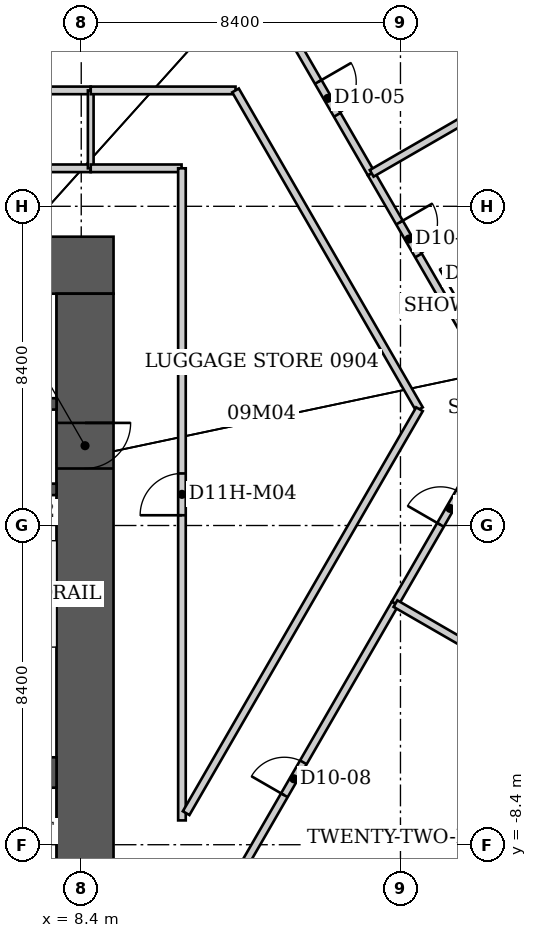
"""IFC4 building model, lengths in metres.
Left out: names, types, materials, properties, quantities, classifications, styles, units other than length and angle.
Written with IfcOpenShell. Run it as: python <this file> out.ifc"""

import sys

from ifc_helpers import new_model, si_unit, direction, frame, frame_2d, origin, place, context, subcontext, project, spatial, rectangle, extrude, element, fill, save


model = new_model("IFC4")
c1 = context("Model", 3, precision=1e-05, world=origin(), true_north=direction((0.0, 1.0)))
c2 = subcontext(c1, "Body", "Model", "MODEL_VIEW")
j1 = project(units=[si_unit("LENGTHUNIT", "METRE"), si_unit("PLANEANGLEUNIT", "RADIAN")], contexts=[c1])
p1 = place(None, origin())
s1 = spatial("IfcSite", under=j1, at=p1, CompositionType="ELEMENT")
p2 = place(p1, origin())
s2 = spatial("IfcBuilding", under=s1, at=p2, CompositionType="ELEMENT")
p3 = place(p2, frame((0.0, 0.0, 42.0)))
s3 = spatial("IfcBuildingStorey", under=s2, at=p3, CompositionType="ELEMENT", Elevation=42.0)
p4 = place(p3, frame((-9.25, 6.85, 0.0), z_axis=(0.0, 0.0, 1.0), x_axis=(1.0, 0.0, 0.0)))
e1 = element("IfcWall", 1, at=p4, inside=s3, PredefinedType="SHEAR", context=c2, shape_type="SweptSolid", body=[
    extrude(rectangle(XDim=18.5, YDim=1.5, at=frame_2d((9.25, 0.0))), origin(), (0.0, 0.0, 1.0), 3.8),
])
p5 = place(p3, frame((8.5, -9.2, 0.0), z_axis=(0.0, 0.0, 1.0), x_axis=(0.0, 1.0, 0.0)))
e2 = element("IfcWall", 2, at=p5, inside=s3, PredefinedType="SHEAR", context=c2, shape_type="SweptSolid", body=[
    extrude(rectangle(XDim=15.3, YDim=1.5, at=frame_2d((7.65, 0.0))), origin(), (0.0, 0.0, 1.0), 3.8),
])
p6 = place(p5, frame((10.7, 0.0, 0.0)))
e3 = element("IfcOpeningElement", 3, at=p6, cuts=e2, PredefinedType="OPENING", context=c2, shape_type="SweptSolid", body=[
    extrude(rectangle(XDim=1.2, YDim=2.2, at=frame_2d((0.6, 1.1))), frame((0.0, 0.75, 0.0), z_axis=(0.0, -1.0, 0.0), x_axis=(1.0, 0.0, 0.0)), (0.0, 0.0, 1.0), 1.5),
])
p7 = place(p3, frame((-7.75, -6.5, 0.0), z_axis=(0.0, 0.0, 1.0), x_axis=(1.0, 0.0, 0.0)))
e4 = element("IfcWall", 4, at=p7, inside=s3, PredefinedType="SHEAR", context=c2, shape_type="SweptSolid", body=[
    extrude(rectangle(XDim=15.5, YDim=0.8, at=frame_2d((7.75, 0.0))), origin(), (0.0, 0.0, 1.0), 3.8),
])
p8 = place(p3, frame((4.75, 0.95, 0.0), z_axis=(0.0, 0.0, 1.0), x_axis=(1.0, 0.0, 0.0)))
e5 = element("IfcWall", 5, at=p8, inside=s3, PredefinedType="SHEAR", context=c2, shape_type="SweptSolid", body=[
    extrude(rectangle(XDim=3.0, YDim=0.3, at=frame_2d((1.5, 0.0))), origin(), (0.0, 0.0, 1.0), 3.8),
])
p9 = place(p8, frame((1.15, 0.0, 0.0)))
e6 = element("IfcOpeningElement", 6, at=p9, cuts=e5, PredefinedType="OPENING", context=c2, shape_type="SweptSolid", body=[
    extrude(rectangle(XDim=1.0, YDim=2.2, at=frame_2d((0.5, 1.1))), frame((0.0, 0.15, 0.0), z_axis=(0.0, -1.0, 0.0), x_axis=(1.0, 0.0, 0.0)), (0.0, 0.0, 1.0), 0.3),
])
p10 = place(p3, frame((-7.75, 3.2, 0.0), z_axis=(0.0, 0.0, 1.0), x_axis=(1.0, 0.0, 0.0)))
e7 = element("IfcWall", 7, at=p10, inside=s3, PredefinedType="SHEAR", context=c2, shape_type="SweptSolid", body=[
    extrude(rectangle(XDim=15.5, YDim=0.3, at=frame_2d((7.75, 0.0))), origin(), (0.0, 0.0, 1.0), 3.8),
])
p11 = place(p10, frame((5.944, 0.0, 0.0)))
e8 = element("IfcOpeningElement", 8, at=p11, cuts=e7, PredefinedType="OPENING", context=c2, shape_type="SweptSolid", body=[
    extrude(rectangle(XDim=1.1, YDim=2.2, at=frame_2d((0.55, 1.1))), frame((0.0, 0.15, 0.0), z_axis=(0.0, -1.0, 0.0), x_axis=(1.0, 0.0, 0.0)), (0.0, 0.0, 1.0), 0.3),
])
p12 = place(p10, frame((11.144, 0.0, 0.0)))
e9 = element("IfcOpeningElement", 9, at=p12, cuts=e7, PredefinedType="OPENING", context=c2, shape_type="SweptSolid", body=[
    extrude(rectangle(XDim=1.1, YDim=2.2, at=frame_2d((0.55, 1.1))), frame((0.0, 0.15, 0.0), z_axis=(0.0, -1.0, 0.0), x_axis=(1.0, 0.0, 0.0)), (0.0, 0.0, 1.0), 0.3),
])
p13 = place(p3, frame((0.0, 11.45, 0.0), z_axis=(0.0, 0.0, 1.0), x_axis=(1.0, 0.0, 0.0)))
e10 = element("IfcWall", 10, at=p13, inside=s3, PredefinedType="PARTITIONING", context=c2, shape_type="SweptSolid", body=[
    extrude(rectangle(XDim=8.65, YDim=0.2, at=frame_2d((4.325, 0.0))), origin(), (0.0, 0.0, 1.0), 3.64),
])
p14 = place(p13, frame((3.775, 0.0, 0.0)))
e11 = element("IfcOpeningElement", 11, at=p14, cuts=e10, PredefinedType="OPENING", context=c2, shape_type="SweptSolid", body=[
    extrude(rectangle(XDim=1.1, YDim=2.2, at=frame_2d((0.55, 1.1))), frame((0.0, 0.1, 0.0), z_axis=(0.0, -1.0, 0.0), x_axis=(1.0, 0.0, 0.0)), (0.0, 0.0, 1.0), 0.2),
])
p15 = place(p3, frame((8.65, 9.4, 0.0), z_axis=(0.0, 0.0, 1.0), x_axis=(-1.0, 0.0, 0.0)))
e12 = element("IfcWall", 12, at=p15, inside=s3, PredefinedType="PARTITIONING", context=c2, shape_type="SweptSolid", body=[
    extrude(rectangle(XDim=8.65, YDim=0.2, at=frame_2d((4.325, 0.0))), origin(), (0.0, 0.0, 1.0), 3.64),
])
p16 = place(p3, frame((8.65, 11.45, 0.0), z_axis=(0.0, 0.0, 1.0), x_axis=(0.0, -1.0, 0.0)))
e13 = element("IfcWall", 13, at=p16, inside=s3, PredefinedType="PARTITIONING", context=c2, shape_type="SweptSolid", body=[
    extrude(rectangle(XDim=2.05, YDim=0.15, at=frame_2d((1.025, 0.0))), origin(), (0.0, 0.0, 1.0), 3.64),
])
p17 = place(p3, frame((8.65, 11.45, 0.0), z_axis=(0.0, 0.0, 1.0), x_axis=(1.0, 0.0, 0.0)))
e14 = element("IfcWall", 14, at=p17, inside=s3, PredefinedType="PARTITIONING", context=c2, shape_type="SweptSolid", body=[
    extrude(rectangle(XDim=3.81, YDim=0.2, at=frame_2d((1.905, 0.0))), origin(), (0.0, 0.0, 1.0), 3.64),
])
p18 = place(p3, frame((11.04, 9.4, 0.0), z_axis=(0.0, 0.0, 1.0), x_axis=(-1.0, 0.0, 0.0)))
e15 = element("IfcWall", 15, at=p18, inside=s3, PredefinedType="PARTITIONING", context=c2, shape_type="SweptSolid", body=[
    extrude(rectangle(XDim=2.39, YDim=0.2, at=frame_2d((1.195, 0.0))), origin(), (0.0, 0.0, 1.0), 3.64),
])
p19 = place(p3, frame((11.05, -7.76, 0.0), z_axis=(0.0, 0.0, 1.0), x_axis=(0.0, 1.0, 0.0)))
e16 = element("IfcWall", 16, at=p19, inside=s3, PredefinedType="PARTITIONING", context=c2, shape_type="SweptSolid", body=[
    extrude(rectangle(XDim=17.16, YDim=0.2, at=frame_2d((8.58, 0.0))), origin(), (0.0, 0.0, 1.0), 3.64),
])
p20 = place(p19, frame((8.03, 0.0, 0.0)))
e17 = element("IfcOpeningElement", 17, at=p20, cuts=e16, PredefinedType="OPENING", context=c2, shape_type="SweptSolid", body=[
    extrude(rectangle(XDim=1.1, YDim=2.2, at=frame_2d((0.55, 1.1))), frame((0.0, 0.1, 0.0), z_axis=(0.0, -1.0, 0.0), x_axis=(1.0, 0.0, 0.0)), (0.0, 0.0, 1.0), 0.2),
])
p21 = place(p3, frame((11.33, -11.28, 0.0), z_axis=(0.0, 0.0, 1.0), x_axis=(0.50006348966, 0.865988744909, 0.0)))
e18 = element("IfcWall", 18, at=p21, inside=s3, PredefinedType="PARTITIONING", context=c2, shape_type="SweptSolid", body=[
    extrude(rectangle(XDim=10.658, YDim=0.2, at=frame_2d((5.329, 0.0))), origin(), (0.0, 0.0, 1.0), 3.64),
])
p22 = place(p21, frame((4.829, 0.0, 0.0)))
e19 = element("IfcOpeningElement", 19, at=p22, cuts=e18, PredefinedType="OPENING", context=c2, shape_type="SweptSolid", body=[
    extrude(rectangle(XDim=1.0, YDim=2.13, at=frame_2d((0.5, 1.065))), frame((0.0, 0.1, 0.0), z_axis=(0.0, -1.0, 0.0), x_axis=(1.0, 0.0, 0.0)), (0.0, 0.0, 1.0), 0.2),
])
p23 = place(p3, frame((12.46, 11.45, 0.0), z_axis=(0.0, 0.0, 1.0), x_axis=(0.499704269421, -0.866196076603, 0.0)))
e20 = element("IfcWall", 20, at=p23, inside=s3, PredefinedType="PARTITIONING", context=c2, shape_type="SweptSolid", body=[
    extrude(rectangle(XDim=9.686, YDim=0.2, at=frame_2d((4.843, 0.0))), origin(), (0.0, 0.0, 1.0), 3.64),
])
p24 = place(p3, frame((13.742, 13.22, 0.0), z_axis=(0.0, 0.0, 1.0), x_axis=(0.500169095125, -0.865927754655, 0.0)))
e21 = element("IfcWall", 21, at=p24, inside=s3, PredefinedType="PARTITIONING", context=c2, shape_type="SweptSolid", body=[
    extrude(rectangle(XDim=4.574, YDim=0.2, at=frame_2d((2.287, 0.0))), origin(), (0.0, 0.0, 1.0), 3.64),
])
p25 = place(p24, frame((1.787, 0.0, 0.0)))
e22 = element("IfcOpeningElement", 22, at=p25, cuts=e21, PredefinedType="OPENING", context=c2, shape_type="SweptSolid", body=[
    extrude(rectangle(XDim=1.0, YDim=2.13, at=frame_2d((0.5, 1.065))), frame((0.0, 0.1, 0.0), z_axis=(0.0, -1.0, 0.0), x_axis=(1.0, 0.0, 0.0)), (0.0, 0.0, 1.0), 0.2),
])
p26 = place(p3, frame((16.03, 9.26, 0.0), z_axis=(0.0, 0.0, 1.0), x_axis=(0.500123041693, -0.865954353975, 0.0)))
e23 = element("IfcWall", 23, at=p26, inside=s3, PredefinedType="PARTITIONING", context=c2, shape_type="SweptSolid", body=[
    extrude(rectangle(XDim=3.974, YDim=0.2, at=frame_2d((1.987, 0.0))), origin(), (0.0, 0.0, 1.0), 3.64),
])
p27 = place(p26, frame((1.487, 0.0, 0.0)))
e24 = element("IfcOpeningElement", 24, at=p27, cuts=e23, PredefinedType="OPENING", context=c2, shape_type="SweptSolid", body=[
    extrude(rectangle(XDim=1.0, YDim=2.13, at=frame_2d((0.5, 1.065))), frame((0.0, 0.1, 0.0), z_axis=(0.0, -1.0, 0.0), x_axis=(1.0, 0.0, 0.0)), (0.0, 0.0, 1.0), 0.2),
])
p28 = place(p3, frame((16.66, -2.05, 0.0), z_axis=(0.0, 0.0, 1.0), x_axis=(0.499994452889, 0.866028606387, 0.0)))
e25 = element("IfcWall", 25, at=p28, inside=s3, PredefinedType="PARTITIONING", context=c2, shape_type="SweptSolid", body=[
    extrude(rectangle(XDim=5.775, YDim=0.2, at=frame_2d((2.888, 0.0))), origin(), (0.0, 0.0, 1.0), 3.64),
])
p29 = place(p28, frame((2.388, 0.0, 0.0)))
e26 = element("IfcOpeningElement", 26, at=p29, cuts=e25, PredefinedType="OPENING", context=c2, shape_type="SweptSolid", body=[
    extrude(rectangle(XDim=1.0, YDim=2.13, at=frame_2d((0.5, 1.065))), frame((0.0, 0.1, 0.0), z_axis=(0.0, -1.0, 0.0), x_axis=(1.0, 0.0, 0.0)), (0.0, 0.0, 1.0), 0.2),
])
p30 = place(p3, frame((17.3, 3.06, 0.0), z_axis=(0.0, 0.0, 1.0), x_axis=(-0.500175206663, -0.865924224537, 0.0)))
e27 = element("IfcWall", 27, at=p30, inside=s3, PredefinedType="PARTITIONING", context=c2, shape_type="SweptSolid", body=[
    extrude(rectangle(XDim=12.275, YDim=0.2, at=frame_2d((6.138, 0.0))), origin(), (0.0, 0.0, 1.0), 3.64),
])
p31 = place(p3, frame((18.018, 5.819, 0.0), z_axis=(0.0, 0.0, 1.0), x_axis=(0.499757016066, -0.866165645181, 0.0)))
e28 = element("IfcWall", 28, at=p31, inside=s3, PredefinedType="PARTITIONING", context=c2, shape_type="SweptSolid", body=[
    extrude(rectangle(XDim=2.446, YDim=0.12, at=frame_2d((1.223, 0.0))), origin(), (0.0, 0.0, 1.0), 3.64),
])
p32 = place(p3, frame((20.33, 7.15, 0.0), z_axis=(0.0, 0.0, 1.0), x_axis=(-0.866654860089, -0.498908161372, 0.0)))
e29 = element("IfcWall", 29, at=p32, inside=s3, PredefinedType="PARTITIONING", context=c2, shape_type="SweptSolid", body=[
    extrude(rectangle(XDim=2.666, YDim=0.12, at=frame_2d((1.333, 0.0))), origin(), (0.0, 0.0, 1.0), 3.64),
])
p33 = place(p32, frame((1.466, 0.0, 0.0)))
e30 = element("IfcOpeningElement", 30, at=p33, cuts=e29, PredefinedType="OPENING", context=c2, shape_type="SweptSolid", body=[
    extrude(rectangle(XDim=0.9, YDim=2.03, at=frame_2d((0.45, 1.015))), frame((0.0, 0.06, 0.0), z_axis=(0.0, -1.0, 0.0), x_axis=(1.0, 0.0, 0.0)), (0.0, 0.0, 1.0), 0.12),
])
p34 = place(p3, frame((23.916, -6.24, 0.0), z_axis=(0.0, 0.0, 1.0), x_axis=(-0.865982991691, 0.500073452706, 0.0)))
e31 = element("IfcWall", 31, at=p34, inside=s3, PredefinedType="PARTITIONING", context=c2, shape_type="SweptSolid", body=[
    extrude(rectangle(XDim=8.369, YDim=0.2, at=frame_2d((4.185, 0.0))), origin(), (0.0, 0.0, 1.0), 3.64),
])
p35 = place(p3, frame((25.886, 14.95, 0.0), z_axis=(0.0, 0.0, 1.0), x_axis=(-0.86604429266, -0.499967282081, 0.0)))
e32 = element("IfcWall", 32, at=p35, inside=s3, PredefinedType="PARTITIONING", context=c2, shape_type="SweptSolid", body=[
    extrude(rectangle(XDim=11.365, YDim=0.2, at=frame_2d((5.683, 0.0))), origin(), (0.0, 0.0, 1.0), 2.86),
])
p36 = place(p25, origin())
e33 = element("IfcDoor", 33, at=p36, inside=s3, OperationType="SINGLE_SWING_LEFT", PredefinedType="DOOR", context=c2, shape_type="SweptSolid", body=[
    extrude(rectangle(XDim=1.0, YDim=2.13, at=frame_2d((0.5, 1.065))), frame((0.0, 0.025, 0.0), z_axis=(0.0, -1.0, 0.0), x_axis=(1.0, 0.0, 0.0)), (0.0, 0.0, 1.0), 0.05),
])
fill(e22, e33)
p37 = place(p27, origin())
e34 = element("IfcDoor", 34, at=p37, inside=s3, OperationType="SINGLE_SWING_LEFT", PredefinedType="DOOR", context=c2, shape_type="SweptSolid", body=[
    extrude(rectangle(XDim=1.0, YDim=2.13, at=frame_2d((0.5, 1.065))), frame((0.0, 0.025, 0.0), z_axis=(0.0, -1.0, 0.0), x_axis=(1.0, 0.0, 0.0)), (0.0, 0.0, 1.0), 0.05),
])
fill(e24, e34)
p38 = place(p33, origin())
e35 = element("IfcDoor", 35, at=p38, inside=s3, OperationType="SINGLE_SWING_RIGHT", PredefinedType="DOOR", context=c2, shape_type="SweptSolid", body=[
    extrude(rectangle(XDim=0.9, YDim=2.03, at=frame_2d((0.45, 1.015))), frame((0.0, 0.025, 0.0), z_axis=(0.0, -1.0, 0.0), x_axis=(1.0, 0.0, 0.0)), (0.0, 0.0, 1.0), 0.05),
])
fill(e30, e35)
p39 = place(p29, origin())
e36 = element("IfcDoor", 36, at=p39, inside=s3, OperationType="SINGLE_SWING_LEFT", PredefinedType="DOOR", context=c2, shape_type="SweptSolid", body=[
    extrude(rectangle(XDim=1.0, YDim=2.13, at=frame_2d((0.5, 1.065))), frame((0.0, 0.025, 0.0), z_axis=(0.0, -1.0, 0.0), x_axis=(1.0, 0.0, 0.0)), (0.0, 0.0, 1.0), 0.05),
])
fill(e26, e36)
p40 = place(p22, origin())
e37 = element("IfcDoor", 37, at=p40, inside=s3, OperationType="SINGLE_SWING_LEFT", PredefinedType="DOOR", context=c2, shape_type="SweptSolid", body=[
    extrude(rectangle(XDim=1.0, YDim=2.13, at=frame_2d((0.5, 1.065))), frame((0.0, 0.025, 0.0), z_axis=(0.0, -1.0, 0.0), x_axis=(1.0, 0.0, 0.0)), (0.0, 0.0, 1.0), 0.05),
])
fill(e19, e37)
p41 = place(p20, origin())
e38 = element("IfcDoor", 38, at=p41, inside=s3, OperationType="SINGLE_SWING_LEFT", PredefinedType="DOOR", context=c2, shape_type="SweptSolid", body=[
    extrude(rectangle(XDim=1.1, YDim=2.2, at=frame_2d((0.55, 1.1))), frame((0.0, 0.025, 0.0), z_axis=(0.0, -1.0, 0.0), x_axis=(1.0, 0.0, 0.0)), (0.0, 0.0, 1.0), 0.05),
])
fill(e17, e38)
p42 = place(p6, origin())
e39 = element("IfcDoor", 39, at=p42, inside=s3, OperationType="SINGLE_SWING_RIGHT", PredefinedType="DOOR", context=c2, shape_type="SweptSolid", body=[
    extrude(rectangle(XDim=1.2, YDim=2.2, at=frame_2d((0.6, 1.1))), frame((0.0, 0.025, 0.0), z_axis=(0.0, -1.0, 0.0), x_axis=(1.0, 0.0, 0.0)), (0.0, 0.0, 1.0), 0.05),
])
fill(e3, e39)
save(model, sys.argv[1])
